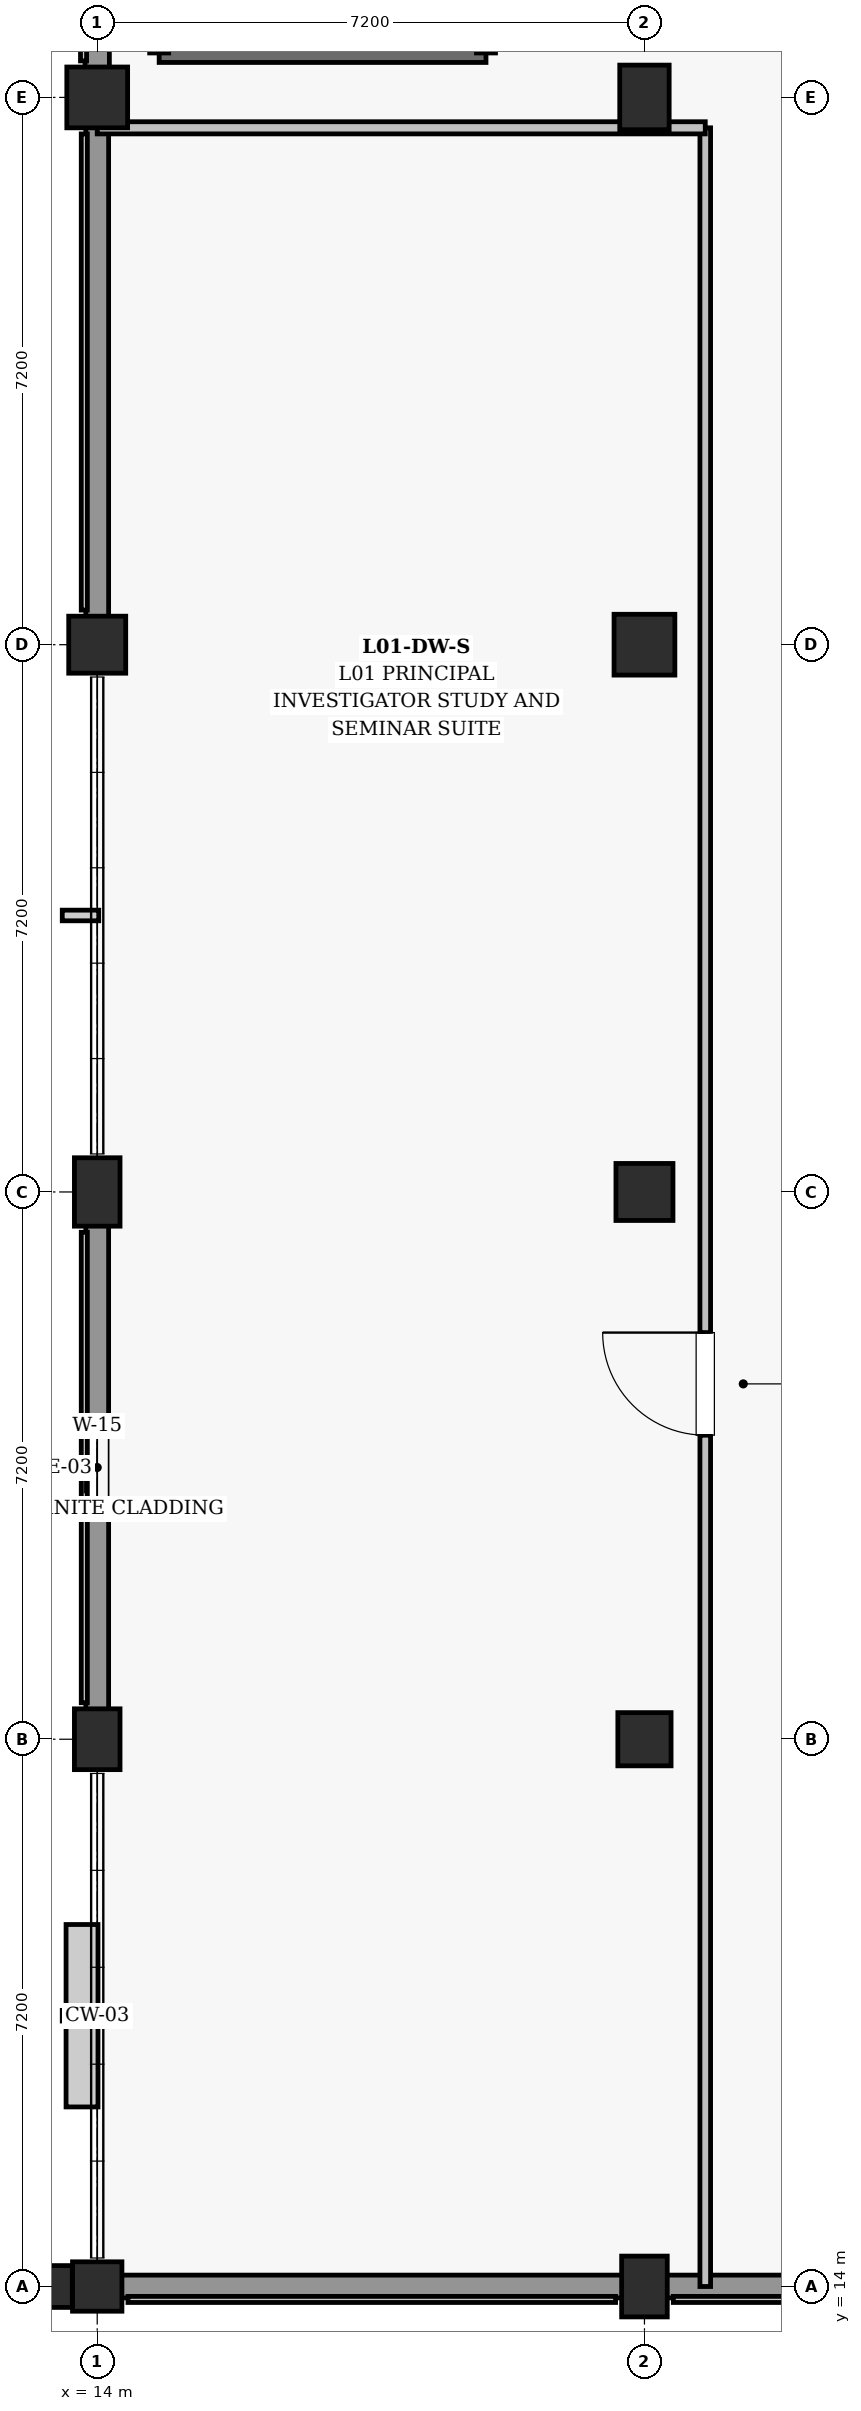
"""IFC4 building model, lengths in metres.
Left out: names, types, materials, properties, quantities, classifications, styles, units other than length and angle.
Written with IfcOpenShell. Run it as: python <this file> out.ifc"""

import sys

from ifc_helpers import new_model, si_unit, direction, frame, frame_2d, origin, origin_2d, place, context, subcontext, project, spatial, rectangle, extrude, element, fill, save


model = new_model("IFC4")
c1 = context("Model", 3, precision=1e-05, world=origin(), true_north=direction((0.0, 1.0)))
c2 = subcontext(c1, "Body", "Model", "MODEL_VIEW")
j1 = project(units=[si_unit("LENGTHUNIT", "METRE"), si_unit("PLANEANGLEUNIT", "RADIAN")], contexts=[c1])
p1 = place(None, origin())
s1 = spatial("IfcSite", under=j1, at=p1, CompositionType="ELEMENT")
p2 = place(p1, origin())
s2 = spatial("IfcBuilding", under=s1, at=p2, CompositionType="ELEMENT")
p3 = place(p2, frame((0.0, 0.0, 5.4)))
s3 = spatial("IfcBuildingStorey", under=s2, at=p3, CompositionType="ELEMENT", Elevation=5.4)
p4 = place(p3, frame((14.0, 14.0, 0.0), z_axis=(0.0, 0.0, 1.0), x_axis=(1.0, 0.0, 0.0)))
e1 = element("IfcColumn", 1, at=p4, inside=s3, PredefinedType="COLUMN", context=c2, shape_type="SweptSolid", body=[
    extrude(rectangle(XDim=0.65, YDim=0.65, at=origin_2d()), origin(), (0.0, 0.0, 1.0), 4.5),
])
p5 = place(p3, frame((14.0, 21.2, 0.0), z_axis=(0.0, 0.0, 1.0), x_axis=(1.0, 0.0, 0.0)))
e2 = element("IfcColumn", 2, at=p5, inside=s3, PredefinedType="COLUMN", context=c2, shape_type="SweptSolid", body=[
    extrude(rectangle(XDim=0.6, YDim=0.8, at=origin_2d()), origin(), (0.0, 0.0, 1.0), 4.5),
])
p6 = place(p3, frame((14.0, 28.4, 0.0), z_axis=(0.0, 0.0, 1.0), x_axis=(1.0, 0.0, 0.0)))
e3 = element("IfcColumn", 3, at=p6, inside=s3, PredefinedType="COLUMN", context=c2, shape_type="SweptSolid", body=[
    extrude(rectangle(XDim=0.6, YDim=0.9, at=origin_2d()), origin(), (0.0, 0.0, 1.0), 4.5),
])
p7 = place(p3, frame((14.0, 35.6, 0.0), z_axis=(0.0, 0.0, 1.0), x_axis=(1.0, 0.0, 0.0)))
e4 = element("IfcColumn", 4, at=p7, inside=s3, PredefinedType="COLUMN", context=c2, shape_type="SweptSolid", body=[
    extrude(rectangle(XDim=0.75, YDim=0.75, at=origin_2d()), origin(), (0.0, 0.0, 1.0), 4.5),
])
p8 = place(p3, frame((14.0, 42.8, 0.0), z_axis=(0.0, 0.0, 1.0), x_axis=(1.0, 0.0, 0.0)))
e5 = element("IfcColumn", 5, at=p8, inside=s3, PredefinedType="COLUMN", context=c2, shape_type="SweptSolid", body=[
    extrude(rectangle(XDim=0.8, YDim=0.8, at=origin_2d()), origin(), (0.0, 0.0, 1.0), 4.5),
])
p9 = place(p3, frame((21.2, 14.0, 0.0), z_axis=(0.0, 0.0, 1.0), x_axis=(1.0, 0.0, 0.0)))
e6 = element("IfcColumn", 6, at=p9, inside=s3, PredefinedType="COLUMN", context=c2, shape_type="SweptSolid", body=[
    extrude(rectangle(XDim=0.6, YDim=0.8, at=origin_2d()), origin(), (0.0, 0.0, 1.0), 4.5),
])
p10 = place(p3, frame((21.2, 21.2, 0.0), z_axis=(0.0, 0.0, 1.0), x_axis=(1.0, 0.0, 0.0)))
e7 = element("IfcColumn", 7, at=p10, inside=s3, PredefinedType="COLUMN", context=c2, shape_type="SweptSolid", body=[
    extrude(rectangle(XDim=0.7, YDim=0.7, at=origin_2d()), origin(), (0.0, 0.0, 1.0), 4.5),
])
p11 = place(p3, frame((21.2, 28.4, 0.0), z_axis=(0.0, 0.0, 1.0), x_axis=(1.0, 0.0, 0.0)))
e8 = element("IfcColumn", 8, at=p11, inside=s3, PredefinedType="COLUMN", context=c2, shape_type="SweptSolid", body=[
    extrude(rectangle(XDim=0.75, YDim=0.75, at=origin_2d()), origin(), (0.0, 0.0, 1.0), 4.5),
])
p12 = place(p3, frame((21.2, 35.6, 0.0), z_axis=(0.0, 0.0, 1.0), x_axis=(1.0, 0.0, 0.0)))
e9 = element("IfcColumn", 9, at=p12, inside=s3, PredefinedType="COLUMN", context=c2, shape_type="SweptSolid", body=[
    extrude(rectangle(XDim=0.8, YDim=0.8, at=origin_2d()), origin(), (0.0, 0.0, 1.0), 4.5),
])
p13 = place(p3, frame((21.2, 42.8, 0.0), z_axis=(0.0, 0.0, 1.0), x_axis=(1.0, 0.0, 0.0)))
e10 = element("IfcColumn", 10, at=p13, inside=s3, PredefinedType="COLUMN", context=c2, shape_type="SweptSolid", body=[
    extrude(rectangle(XDim=0.65, YDim=0.85, at=origin_2d()), origin(), (0.0, 0.0, 1.0), 4.5),
])
p14 = place(p3, frame((13.272, 14.0, 0.0), z_axis=(0.0, 0.0, 1.0), x_axis=(0.0, 1.0, 0.0)))
e11 = element("IfcColumn", 11, at=p14, inside=s3, PredefinedType="PILASTER", context=c2, shape_type="SweptSolid", body=[
    extrude(rectangle(XDim=0.55, YDim=0.8, at=origin_2d()), origin(), (0.0, 0.0, 1.0), 4.5),
])
p15 = place(p3, frame((14.0, 21.58, 0.0), z_axis=(0.0, 0.0, 1.0), x_axis=(0.0, 1.0, 0.0)))
e12 = element("IfcWall", 12, at=p15, inside=s3, PredefinedType="SOLIDWALL", context=c2, shape_type="SweptSolid", body=[
    extrude(rectangle(XDim=6.39, YDim=0.3, at=frame_2d((3.195, 0.0))), origin(), (0.0, 0.0, 1.0), 3.455),
])
p16 = place(p15, frame((2.72, 0.0, 0.95)))
e13 = element("IfcOpeningElement", 13, at=p16, cuts=e12, PredefinedType="OPENING", context=c2, shape_type="SweptSolid", body=[
    extrude(rectangle(XDim=0.95, YDim=2.1, at=frame_2d((0.475, 1.05))), frame((0.0, 0.16, 0.0), z_axis=(0.0, -1.0, 0.0), x_axis=(1.0, 0.0, 0.0)), (0.0, 0.0, 1.0), 0.32),
])
p17 = place(p3, frame((14.0, 35.955, 0.0), z_axis=(0.0, 0.0, 1.0), x_axis=(0.0, 1.0, 0.0)))
e14 = element("IfcWall", 14, at=p17, inside=s3, PredefinedType="SOLIDWALL", context=c2, shape_type="SweptSolid", body=[
    extrude(rectangle(XDim=6.465, YDim=0.3, at=frame_2d((3.232, 0.0))), origin(), (0.0, 0.0, 1.0), 3.375),
])
p18 = place(p3, frame((14.0, 43.18, 0.0), z_axis=(0.0, 0.0, 1.0), x_axis=(0.0, 1.0, 0.0)))
e15 = element("IfcWall", 15, at=p18, inside=s3, PredefinedType="SOLIDWALL", context=c2, shape_type="SweptSolid", body=[
    extrude(rectangle(XDim=6.44, YDim=0.32, at=frame_2d((3.22, 0.0))), origin(), (0.0, 0.0, 1.0), 3.375),
])
p19 = place(p3, frame((14.305, 14.0, 0.0), z_axis=(0.0, 0.0, 1.0), x_axis=(1.0, 0.0, 0.0)))
e16 = element("IfcWall", 16, at=p19, inside=s3, PredefinedType="SOLIDWALL", context=c2, shape_type="SweptSolid", body=[
    extrude(rectangle(XDim=6.615, YDim=0.3, at=frame_2d((3.308, 0.0))), origin(), (0.0, 0.0, 1.0), 3.575),
])
p20 = place(p3, frame((21.48, 14.0, 0.0), z_axis=(0.0, 0.0, 1.0), x_axis=(1.0, 0.0, 0.0)))
e17 = element("IfcWall", 17, at=p20, inside=s3, PredefinedType="SOLIDWALL", context=c2, shape_type="SweptSolid", body=[
    extrude(rectangle(XDim=6.59, YDim=0.3, at=frame_2d((3.295, 0.0))), origin(), (0.0, 0.0, 1.0), 3.475),
])
p21 = place(p3, frame((14.815, 43.385, 0.0), z_axis=(0.0, 0.0, 1.0), x_axis=(1.0, 0.0, 0.0)))
e18 = element("IfcWall", 18, at=p21, inside=s3, PredefinedType="SHEAR", context=c2, shape_type="SweptSolid", body=[
    extrude(rectangle(XDim=4.3, YDim=0.25, at=frame_2d((2.15, 0.0))), origin(), (0.0, 0.0, 1.0), 4.195),
])
p22 = place(p3, frame((19.115, 43.385, 0.0), z_axis=(0.0, 0.0, 1.0), x_axis=(0.0, 1.0, 0.0)))
e19 = element("IfcWall", 19, at=p22, inside=s3, PredefinedType="SHEAR", context=c2, shape_type="SweptSolid", body=[
    extrude(rectangle(XDim=10.63, YDim=0.25, at=frame_2d((5.315, 0.0))), origin(), (0.0, 0.0, 1.0), 4.195),
])
p23 = place(p22, frame((0.55, 0.0, 0.0)))
e20 = element("IfcOpeningElement", 20, at=p23, cuts=e19, PredefinedType="OPENING", context=c2, shape_type="SweptSolid", body=[
    extrude(rectangle(XDim=1.2, YDim=2.15, at=frame_2d((0.6, 1.075))), frame((0.0, 0.135, 0.0), z_axis=(0.0, -1.0, 0.0), x_axis=(1.0, 0.0, 0.0)), (0.0, 0.0, 1.0), 0.27),
])
p24 = place(p3, frame((14.815, 54.015, 0.0), z_axis=(0.0, 0.0, 1.0), x_axis=(0.0, -1.0, 0.0)))
e21 = element("IfcWall", 21, at=p24, inside=s3, PredefinedType="SHEAR", context=c2, shape_type="SweptSolid", body=[
    extrude(rectangle(XDim=10.63, YDim=0.25, at=frame_2d((5.315, 0.0))), origin(), (0.0, 0.0, 1.0), 4.195),
])
p25 = place(p3, frame((22.0, 14.0, 0.0), z_axis=(0.0, 0.0, 1.0), x_axis=(0.0, 1.0, 0.0)))
e22 = element("IfcWall", 22, at=p25, inside=s3, PredefinedType="PARTITIONING", context=c2, shape_type="SweptSolid", body=[
    extrude(rectangle(XDim=28.4, YDim=0.14, at=frame_2d((14.2, 0.0))), origin(), (0.0, 0.0, 1.0), 3.48),
])
p26 = place(p25, frame((11.2, 0.0, 0.0)))
e23 = element("IfcOpeningElement", 23, at=p26, cuts=e22, PredefinedType="OPENING", context=c2, shape_type="SweptSolid", body=[
    extrude(rectangle(XDim=1.35, YDim=2.2, at=frame_2d((0.675, 1.1))), frame((0.0, 0.08, 0.0), z_axis=(0.0, -1.0, 0.0), x_axis=(1.0, 0.0, 0.0)), (0.0, 0.0, 1.0), 0.16),
])
p27 = place(p3, frame((14.0, 42.4, 0.0), z_axis=(0.0, 0.0, 1.0), x_axis=(1.0, 0.0, 0.0)))
e24 = element("IfcWall", 24, at=p27, inside=s3, PredefinedType="PARTITIONING", context=c2, shape_type="SweptSolid", body=[
    extrude(rectangle(XDim=8.0, YDim=0.16, at=frame_2d((4.0, 0.0))), origin(), (0.0, 0.0, 1.0), 3.58),
])
p28 = place(p16, origin())
e25 = element("IfcWindow", 25, at=p28, inside=s3, PartitioningType="SINGLE_PANEL", PredefinedType="WINDOW", context=c2, shape_type="SweptSolid", body=[
    extrude(rectangle(XDim=0.95, YDim=2.1, at=frame_2d((0.475, 1.05))), frame((0.0, 0.03, 0.0), z_axis=(0.0, -1.0, 0.0), x_axis=(1.0, 0.0, 0.0)), (0.0, 0.0, 1.0), 0.06),
])
fill(e13, e25)
p29 = place(p26, origin())
e26 = element("IfcDoor", 26, at=p29, inside=s3, OperationType="SINGLE_SWING_RIGHT", PredefinedType="DOOR", context=c2, shape_type="SweptSolid", body=[
    extrude(rectangle(XDim=1.35, YDim=2.2, at=frame_2d((0.675, 1.1))), frame((0.0, 0.025, 0.0), z_axis=(0.0, -1.0, 0.0), x_axis=(1.0, 0.0, 0.0)), (0.0, 0.0, 1.0), 0.05),
])
fill(e23, e26)
save(model, sys.argv[1])
